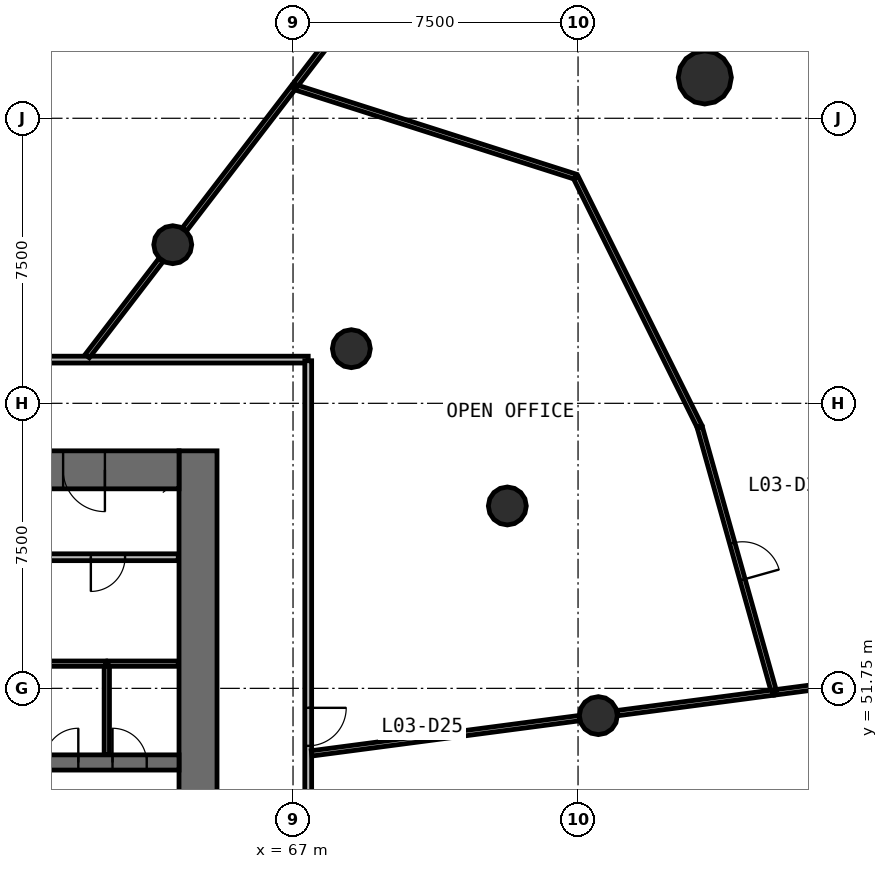
"""IFC4 building model, lengths in metres.
Left out: names, types, materials, properties, quantities, classifications, styles, units other than length and angle.
Written with IfcOpenShell. Run it as: python <this file> out.ifc"""

import sys

from ifc_helpers import new_model, si_unit, direction, frame, frame_2d, origin, origin_2d, place, context, subcontext, project, spatial, rectangle, circle, extrude, source, transform, mapped, element, fill, save


model = new_model("IFC4")
c1 = context("Model", 3, precision=1e-05, world=origin(), true_north=direction((0.0, 1.0)))
c2 = subcontext(c1, "Body", "Model", "MODEL_VIEW")
j1 = project(units=[si_unit("LENGTHUNIT", "METRE"), si_unit("PLANEANGLEUNIT", "RADIAN")], contexts=[c1])
p1 = place(None, origin())
s1 = spatial("IfcSite", under=j1, at=p1, CompositionType="ELEMENT")
p2 = place(p1, origin())
s2 = spatial("IfcBuilding", under=s1, at=p2, CompositionType="ELEMENT")
p3 = place(p2, frame((0.0, 0.0, 13.8)))
s3 = spatial("IfcBuildingStorey", under=s2, at=p3, CompositionType="ELEMENT", Elevation=13.8)
p4 = place(p3, frame((64.5, 38.0, 0.0), z_axis=(0.0, 0.0, 1.0), x_axis=(0.0, 1.0, 0.0)))
e1 = element("IfcWall", 1, at=p4, inside=s3, PredefinedType="SHEAR", context=c2, shape_type="SweptSolid", body=[
    extrude(rectangle(XDim=20.0, YDim=1.0, at=frame_2d((10.0, 0.0))), origin(), (0.0, 0.0, 1.0), 4.4),
])
p5 = place(p4, frame((9.1, 0.0, 0.0)))
e2 = element("IfcOpeningElement", 2, at=p5, cuts=e1, PredefinedType="OPENING", context=c2, shape_type="SweptSolid", body=[
    extrude(rectangle(XDim=1.8, YDim=2.1, at=frame_2d((0.9, 1.05))), frame((0.0, 0.51, 0.0), z_axis=(0.0, -1.0, 0.0), x_axis=(1.0, 0.0, 0.0)), (0.0, 0.0, 1.0), 1.02),
])
p6 = place(p3, frame((64.0, 57.5, 0.0), z_axis=(0.0, 0.0, 1.0), x_axis=(-1.0, 0.0, 0.0)))
e3 = element("IfcWall", 3, at=p6, inside=s3, PredefinedType="SHEAR", context=c2, shape_type="SweptSolid", body=[
    extrude(rectangle(XDim=24.0, YDim=1.0, at=frame_2d((12.0, 0.0))), origin(), (0.0, 0.0, 1.0), 4.4),
])
p7 = place(p6, frame((21.45, 0.0, 0.0)))
e4 = element("IfcOpeningElement", 4, at=p7, cuts=e3, PredefinedType="OPENING", context=c2, shape_type="SweptSolid", body=[
    extrude(rectangle(XDim=1.1, YDim=2.1, at=frame_2d((0.55, 1.05))), frame((0.0, 0.51, 0.0), z_axis=(0.0, -1.0, 0.0), x_axis=(1.0, 0.0, 0.0)), (0.0, 0.0, 1.0), 1.02),
])
p8 = place(p6, frame((1.95, 0.0, 0.0)))
e5 = element("IfcOpeningElement", 5, at=p8, cuts=e3, PredefinedType="OPENING", context=c2, shape_type="SweptSolid", body=[
    extrude(rectangle(XDim=1.1, YDim=2.1, at=frame_2d((0.55, 1.05))), frame((0.0, 0.51, 0.0), z_axis=(0.0, -1.0, 0.0), x_axis=(1.0, 0.0, 0.0)), (0.0, 0.0, 1.0), 1.02),
])
p9 = place(p3, frame((40.0, 49.8, 0.0), z_axis=(0.0, 0.0, 1.0), x_axis=(1.0, 0.0, 0.0)))
e6 = element("IfcWall", 6, at=p9, inside=s3, PredefinedType="SHEAR", context=c2, shape_type="SweptSolid", body=[
    extrude(rectangle(XDim=24.0, YDim=0.4, at=frame_2d((12.0, 0.0))), origin(), (0.0, 0.0, 1.0), 4.4),
])
p10 = place(p9, frame((4.5, 0.0, 0.0)))
e7 = element("IfcOpeningElement", 7, at=p10, cuts=e6, PredefinedType="OPENING", context=c2, shape_type="SweptSolid", body=[
    extrude(rectangle(XDim=1.1, YDim=2.1, at=frame_2d((0.55, 1.05))), frame((0.0, 0.21, 0.0), z_axis=(0.0, -1.0, 0.0), x_axis=(1.0, 0.0, 0.0)), (0.0, 0.0, 1.0), 0.42),
])
p11 = place(p9, frame((7.0, 0.0, 0.0)))
e8 = element("IfcOpeningElement", 8, at=p11, cuts=e6, PredefinedType="OPENING", context=c2, shape_type="SweptSolid", body=[
    extrude(rectangle(XDim=1.1, YDim=2.1, at=frame_2d((0.55, 1.05))), frame((0.0, 0.21, 0.0), z_axis=(0.0, -1.0, 0.0), x_axis=(1.0, 0.0, 0.0)), (0.0, 0.0, 1.0), 0.42),
])
p12 = place(p9, frame((9.5, 0.0, 0.0)))
e9 = element("IfcOpeningElement", 9, at=p12, cuts=e6, PredefinedType="OPENING", context=c2, shape_type="SweptSolid", body=[
    extrude(rectangle(XDim=1.1, YDim=2.1, at=frame_2d((0.55, 1.05))), frame((0.0, 0.21, 0.0), z_axis=(0.0, -1.0, 0.0), x_axis=(1.0, 0.0, 0.0)), (0.0, 0.0, 1.0), 0.42),
])
p13 = place(p9, frame((0.9, 0.0, 0.0)))
e10 = element("IfcOpeningElement", 10, at=p13, cuts=e6, PredefinedType="OPENING", context=c2, shape_type="SweptSolid", body=[
    extrude(rectangle(XDim=1.8, YDim=2.4, at=frame_2d((0.9, 1.2))), frame((0.0, 0.21, 0.0), z_axis=(0.0, -1.0, 0.0), x_axis=(1.0, 0.0, 0.0)), (0.0, 0.0, 1.0), 0.42),
])
p14 = place(p9, frame((20.45, 0.0, 0.0)))
e11 = element("IfcOpeningElement", 11, at=p14, cuts=e6, PredefinedType="OPENING", context=c2, shape_type="SweptSolid", body=[
    extrude(rectangle(XDim=0.9, YDim=2.1, at=frame_2d((0.45, 1.05))), frame((0.0, 0.21, 0.0), z_axis=(0.0, -1.0, 0.0), x_axis=(1.0, 0.0, 0.0)), (0.0, 0.0, 1.0), 0.42),
])
p15 = place(p9, frame((22.25, 0.0, 0.0)))
e12 = element("IfcOpeningElement", 12, at=p15, cuts=e6, PredefinedType="OPENING", context=c2, shape_type="SweptSolid", body=[
    extrude(rectangle(XDim=0.9, YDim=2.1, at=frame_2d((0.45, 1.05))), frame((0.0, 0.21, 0.0), z_axis=(0.0, -1.0, 0.0), x_axis=(1.0, 0.0, 0.0)), (0.0, 0.0, 1.0), 0.42),
])
p16 = place(p9, frame((11.65, 0.0, 0.0)))
e13 = element("IfcOpeningElement", 13, at=p16, cuts=e6, PredefinedType="OPENING", context=c2, shape_type="SweptSolid", body=[
    extrude(rectangle(XDim=0.9, YDim=2.1, at=frame_2d((0.45, 1.05))), frame((0.0, 0.21, 0.0), z_axis=(0.0, -1.0, 0.0), x_axis=(1.0, 0.0, 0.0)), (0.0, 0.0, 1.0), 0.42),
])
m1 = source(origin(), c2, "Body", "SweptSolid", [
    extrude(circle(Radius=0.7, at=origin_2d()), origin(), (0.0, 0.0, 1.0), 4.4),
])
p17 = place(p3, frame((77.836, 67.824, 0.0), z_axis=(0.0, 0.0, 1.0), x_axis=(1.0, 0.0, 0.0)))
e14 = element("IfcColumn", 14, at=p17, inside=s3, PredefinedType="COLUMN", context=c2, shape_type="MappedRepresentation", body=[
    mapped(m1, transform((0.0, 0.0, 0.0), scale=1.0)),
])
m2 = source(origin(), c2, "Body", "SweptSolid", [
    extrude(circle(Radius=0.5, at=origin_2d()), origin(), (0.0, 0.0, 1.0), 4.4),
])
for number, where, z_axis, x_axis in (
    (15, (75.034, 51.032, 0.0), (0.0, 0.0, 1.0), (1.0, 0.0, 0.0)),
    (16, (72.639, 56.549, 0.0), (0.0, 0.0, 1.0), (1.0, 0.0, 0.0)),
    (17, (68.535, 60.688, 0.0), (0.0, 0.0, 1.0), (1.0, 0.0, 0.0)),
    (18, (63.835, 63.424, 0.0), (0.0, 0.0, 1.0), (1.0, 0.0, 0.0)),
):
    element("IfcColumn", number, at=place(p3, frame(where, z_axis=z_axis, x_axis=x_axis)), inside=s3, PredefinedType="COLUMN", context=c2, shape_type="MappedRepresentation", body=[
        mapped(m2, transform((0.0, 0.0, 0.0), scale=1.0)),
    ])
p18 = place(p3, frame((36.6, 60.4, 0.0), z_axis=(0.0, 0.0, 1.0), x_axis=(1.0, 0.0, 0.0)))
e19 = element("IfcWall", 19, at=p18, inside=s3, PredefinedType="PARTITIONING", context=c2, shape_type="SweptSolid", body=[
    extrude(rectangle(XDim=30.8, YDim=0.18, at=frame_2d((15.4, 0.0))), origin(), (0.0, 0.0, 1.0), 3.25),
])
p19 = place(p18, frame((17.35, 0.0, 0.0)))
e20 = element("IfcOpeningElement", 20, at=p19, cuts=e19, PredefinedType="OPENING", context=c2, shape_type="SweptSolid", body=[
    extrude(rectangle(XDim=1.0, YDim=2.1, at=frame_2d((0.5, 1.05))), frame((0.0, 0.1, 0.0), z_axis=(0.0, -1.0, 0.0), x_axis=(1.0, 0.0, 0.0)), (0.0, 0.0, 1.0), 0.2),
])
p20 = place(p18, frame((14.85, 0.0, 0.0)))
e21 = element("IfcOpeningElement", 21, at=p20, cuts=e19, PredefinedType="OPENING", context=c2, shape_type="SweptSolid", body=[
    extrude(rectangle(XDim=0.9, YDim=2.1, at=frame_2d((0.45, 1.05))), frame((0.0, 0.1, 0.0), z_axis=(0.0, -1.0, 0.0), x_axis=(1.0, 0.0, 0.0)), (0.0, 0.0, 1.0), 0.2),
])
p21 = place(p18, frame((12.65, 0.0, 0.0)))
e22 = element("IfcOpeningElement", 22, at=p21, cuts=e19, PredefinedType="OPENING", context=c2, shape_type="SweptSolid", body=[
    extrude(rectangle(XDim=0.9, YDim=2.1, at=frame_2d((0.45, 1.05))), frame((0.0, 0.1, 0.0), z_axis=(0.0, -1.0, 0.0), x_axis=(1.0, 0.0, 0.0)), (0.0, 0.0, 1.0), 0.2),
])
p22 = place(p18, frame((8.95, 0.0, 0.0)))
e23 = element("IfcOpeningElement", 23, at=p22, cuts=e19, PredefinedType="OPENING", context=c2, shape_type="SweptSolid", body=[
    extrude(rectangle(XDim=1.0, YDim=2.1, at=frame_2d((0.5, 1.05))), frame((0.0, 0.1, 0.0), z_axis=(0.0, -1.0, 0.0), x_axis=(1.0, 0.0, 0.0)), (0.0, 0.0, 1.0), 0.2),
])
p23 = place(p3, frame((67.4, 60.37, 0.0), z_axis=(0.0, 0.0, 1.0), x_axis=(0.0, -1.0, 0.0)))
e24 = element("IfcWall", 24, at=p23, inside=s3, PredefinedType="PARTITIONING", context=c2, shape_type="SweptSolid", body=[
    extrude(rectangle(XDim=23.583, YDim=0.18, at=frame_2d((11.791, 0.0))), origin(), (0.0, 0.0, 1.0), 3.25),
])
p24 = place(p23, frame((11.333, 0.0, 0.0)))
e25 = element("IfcOpeningElement", 25, at=p24, cuts=e24, PredefinedType="OPENING", context=c2, shape_type="SweptSolid", body=[
    extrude(rectangle(XDim=1.0, YDim=2.1, at=frame_2d((0.5, 1.05))), frame((0.0, 0.1, 0.0), z_axis=(0.0, -1.0, 0.0), x_axis=(1.0, 0.0, 0.0)), (0.0, 0.0, 1.0), 0.2),
])
p25 = place(p23, frame((9.133, 0.0, 0.0)))
e26 = element("IfcOpeningElement", 26, at=p25, cuts=e24, PredefinedType="OPENING", context=c2, shape_type="SweptSolid", body=[
    extrude(rectangle(XDim=1.0, YDim=2.1, at=frame_2d((0.5, 1.05))), frame((0.0, 0.1, 0.0), z_axis=(0.0, -1.0, 0.0), x_axis=(1.0, 0.0, 0.0)), (0.0, 0.0, 1.0), 0.2),
])
p26 = place(p23, frame((19.133, 0.0, 0.0)))
e27 = element("IfcOpeningElement", 27, at=p26, cuts=e24, PredefinedType="OPENING", context=c2, shape_type="SweptSolid", body=[
    extrude(rectangle(XDim=1.0, YDim=2.1, at=frame_2d((0.5, 1.05))), frame((0.0, 0.1, 0.0), z_axis=(0.0, -1.0, 0.0), x_axis=(1.0, 0.0, 0.0)), (0.0, 0.0, 1.0), 0.2),
])
p27 = place(p3, frame((63.98, 55.2, 0.0), z_axis=(0.0, 0.0, 1.0), x_axis=(-1.0, 0.0, 0.0)))
e28 = element("IfcWall", 28, at=p27, inside=s3, PredefinedType="PARTITIONING", context=c2, shape_type="SweptSolid", body=[
    extrude(rectangle(XDim=3.75, YDim=0.18, at=frame_2d((1.875, 0.0))), origin(), (0.0, 0.0, 1.0), 4.05),
])
p28 = place(p27, frame((1.4, 0.0, 0.0)))
e29 = element("IfcOpeningElement", 29, at=p28, cuts=e28, PredefinedType="OPENING", context=c2, shape_type="SweptSolid", body=[
    extrude(rectangle(XDim=0.9, YDim=2.1, at=frame_2d((0.45, 1.05))), frame((0.0, 0.1, 0.0), z_axis=(0.0, -1.0, 0.0), x_axis=(1.0, 0.0, 0.0)), (0.0, 0.0, 1.0), 0.2),
])
p29 = place(p3, frame((74.432, 65.213, 0.0), z_axis=(0.0, 0.0, 1.0), x_axis=(-0.952603673554, 0.304214136967, 0.0)))
e30 = element("IfcWall", 30, at=p29, inside=s3, PredefinedType="PARTITIONING", context=c2, shape_type="SweptSolid", body=[
    extrude(rectangle(XDim=7.777, YDim=0.14, at=frame_2d((3.889, 0.0))), origin(), (0.0, 0.0, 1.0), 3.25),
])
p30 = place(p3, frame((79.66, 51.642, 0.0), z_axis=(0.0, 0.0, 1.0), x_axis=(0.991446737275, 0.130511942543, 0.0)))
e31 = element("IfcWall", 31, at=p30, inside=s3, PredefinedType="PARTITIONING", context=c2, shape_type="SweptSolid", body=[
    extrude(rectangle(XDim=7.698, YDim=0.14, at=frame_2d((3.849, 0.0))), origin(), (0.0, 0.0, 1.0), 3.25),
])
p31 = place(p3, frame((77.696, 58.644, 0.0), z_axis=(0.0, 0.0, 1.0), x_axis=(-0.444912861123, 0.895573864071, 0.0)))
e32 = element("IfcWall", 32, at=p31, inside=s3, PredefinedType="PARTITIONING", context=c2, shape_type="SweptSolid", body=[
    extrude(rectangle(XDim=7.305, YDim=0.14, at=frame_2d((3.653, 0.0))), origin(), (0.0, 0.0, 1.0), 3.25),
])
p32 = place(p3, frame((77.704, 58.615, 0.0), z_axis=(0.0, 0.0, 1.0), x_axis=(0.27015344918, -0.9628172796, 0.0)))
e33 = element("IfcWall", 33, at=p32, inside=s3, PredefinedType="PARTITIONING", context=c2, shape_type="SweptSolid", body=[
    extrude(rectangle(XDim=7.212, YDim=0.14, at=frame_2d((3.606, 0.0))), origin(), (0.0, 0.0, 1.0), 3.25),
])
p33 = place(p32, frame((3.163, 0.0, 0.0)))
e34 = element("IfcOpeningElement", 34, at=p33, cuts=e33, PredefinedType="OPENING", context=c2, shape_type="SweptSolid", body=[
    extrude(rectangle(XDim=1.0, YDim=2.1, at=frame_2d((0.5, 1.05))), frame((0.0, 0.08, 0.0), z_axis=(0.0, -1.0, 0.0), x_axis=(1.0, 0.0, 0.0)), (0.0, 0.0, 1.0), 0.16),
])
p34 = place(p3, frame((67.49, 50.039, 0.0), z_axis=(0.0, 0.0, 1.0), x_axis=(0.99144622305, 0.130515848849, 0.0)))
e35 = element("IfcWall", 35, at=p34, inside=s3, PredefinedType="PARTITIONING", context=c2, shape_type="SweptSolid", body=[
    extrude(rectangle(XDim=7.104, YDim=0.14, at=frame_2d((3.552, 0.0))), origin(), (0.0, 0.0, 1.0), 3.25),
])
p35 = place(p3, frame((67.069, 67.638, 0.0), z_axis=(0.0, 0.0, 1.0), x_axis=(0.608784649219, 0.793335522258, 0.0)))
e36 = element("IfcWall", 36, at=p35, inside=s3, PredefinedType="PARTITIONING", context=c2, shape_type="SweptSolid", body=[
    extrude(rectangle(XDim=4.92, YDim=0.14, at=frame_2d((2.46, 0.0))), origin(), (0.0, 0.0, 1.0), 3.25),
])
p36 = place(p3, frame((64.142, 63.824, 0.0), z_axis=(0.0, 0.0, 1.0), x_axis=(0.608759522286, 0.793354803368, 0.0)))
e37 = element("IfcWall", 37, at=p36, inside=s3, PredefinedType="PARTITIONING", context=c2, shape_type="SweptSolid", body=[
    extrude(rectangle(XDim=4.703, YDim=0.14, at=frame_2d((2.352, 0.0))), origin(), (0.0, 0.0, 1.0), 3.25),
])
p37 = place(p3, frame((75.534, 51.098, 0.0), z_axis=(0.0, 0.0, 1.0), x_axis=(0.99144685344, 0.130511060083, 0.0)))
e38 = element("IfcWall", 38, at=p37, inside=s3, PredefinedType="PARTITIONING", context=c2, shape_type="SweptSolid", body=[
    extrude(rectangle(XDim=4.132, YDim=0.14, at=frame_2d((2.066, 0.0))), origin(), (0.0, 0.0, 1.0), 3.25),
])
p38 = place(p3, frame((61.584, 60.49, 0.0), z_axis=(0.0, 0.0, 1.0), x_axis=(0.60874605662, 0.793365135703, 0.0)))
e39 = element("IfcWall", 39, at=p38, inside=s3, PredefinedType="PARTITIONING", context=c2, shape_type="SweptSolid", body=[
    extrude(rectangle(XDim=3.194, YDim=0.14, at=frame_2d((1.597, 0.0))), origin(), (0.0, 0.0, 1.0), 3.25),
])
p39 = place(p3, frame((62.1, 50.01, 0.0), z_axis=(0.0, 0.0, 1.0), x_axis=(0.0, 1.0, 0.0)))
e40 = element("IfcWall", 40, at=p39, inside=s3, PredefinedType="PARTITIONING", context=c2, shape_type="SweptSolid", body=[
    extrude(rectangle(XDim=2.39, YDim=0.14, at=frame_2d((1.195, 0.0))), origin(), (0.0, 0.0, 1.0), 3.25),
])
p40 = place(p3, frame((62.07, 52.4, 0.0), z_axis=(0.0, 0.0, 1.0), x_axis=(-1.0, 0.0, 0.0)))
e41 = element("IfcWall", 41, at=p40, inside=s3, PredefinedType="PARTITIONING", context=c2, shape_type="SweptSolid", body=[
    extrude(rectangle(XDim=1.84, YDim=0.14, at=frame_2d((0.92, 0.0))), origin(), (0.0, 0.0, 1.0), 3.25),
])
p41 = place(p3, frame((63.98, 52.4, 0.0), z_axis=(0.0, 0.0, 1.0), x_axis=(-1.0, 0.0, 0.0)))
e42 = element("IfcWall", 42, at=p41, inside=s3, PredefinedType="PARTITIONING", context=c2, shape_type="SweptSolid", body=[
    extrude(rectangle(XDim=1.85, YDim=0.14, at=frame_2d((0.925, 0.0))), origin(), (0.0, 0.0, 1.0), 3.25),
])
m3 = source(origin(), c2, "Body", "SweptSolid", [
    extrude(rectangle(XDim=1.1, YDim=2.1, at=frame_2d((0.55, 1.05))), frame((0.0, 0.025, 0.0), z_axis=(0.0, -1.0, 0.0), x_axis=(1.0, 0.0, 0.0)), (0.0, 0.0, 1.0), 0.05),
])
p42 = place(p8, origin())
e43 = element("IfcDoor", 43, at=p42, inside=s3, OperationType="SINGLE_SWING_LEFT", PredefinedType="DOOR", context=c2, shape_type="MappedRepresentation", body=[
    mapped(m3, transform((0.0, 0.0, 0.0), scale=1.0)),
])
fill(e5, e43)
m4 = source(origin(), c2, "Body", "SweptSolid", [
    extrude(rectangle(XDim=1.0, YDim=2.1, at=frame_2d((0.5, 1.05))), frame((0.0, 0.025, 0.0), z_axis=(0.0, -1.0, 0.0), x_axis=(1.0, 0.0, 0.0)), (0.0, 0.0, 1.0), 0.05),
])
p43 = place(p25, origin())
e44 = element("IfcDoor", 44, at=p43, inside=s3, OperationType="SINGLE_SWING_LEFT", PredefinedType="DOOR", context=c2, shape_type="MappedRepresentation", body=[
    mapped(m4, transform((0.0, 0.0, 0.0), scale=1.0)),
])
fill(e26, e44)
p44 = place(p33, origin())
e45 = element("IfcDoor", 45, at=p44, inside=s3, OperationType="SINGLE_SWING_RIGHT", PredefinedType="DOOR", context=c2, shape_type="MappedRepresentation", body=[
    mapped(m4, transform((0.0, 0.0, 0.0), scale=1.0)),
])
fill(e34, e45)
m5 = source(origin(), c2, "Body", "SweptSolid", [
    extrude(rectangle(XDim=0.9, YDim=2.1, at=frame_2d((0.45, 1.05))), frame((0.0, 0.025, 0.0), z_axis=(0.0, -1.0, 0.0), x_axis=(1.0, 0.0, 0.0)), (0.0, 0.0, 1.0), 0.05),
])
p45 = place(p14, origin())
e46 = element("IfcDoor", 46, at=p45, inside=s3, OperationType="SINGLE_SWING_RIGHT", PredefinedType="DOOR", context=c2, shape_type="MappedRepresentation", body=[
    mapped(m5, transform((0.0, 0.0, 0.0), scale=1.0)),
])
fill(e11, e46)
p46 = place(p15, origin())
e47 = element("IfcDoor", 47, at=p46, inside=s3, OperationType="SINGLE_SWING_LEFT", PredefinedType="DOOR", context=c2, shape_type="MappedRepresentation", body=[
    mapped(m5, transform((0.0, 0.0, 0.0), scale=1.0)),
])
fill(e12, e47)
p47 = place(p28, origin())
e48 = element("IfcDoor", 48, at=p47, inside=s3, OperationType="SINGLE_SWING_RIGHT", PredefinedType="DOOR", context=c2, shape_type="MappedRepresentation", body=[
    mapped(m5, transform((0.0, 0.0, 0.0), scale=1.0)),
])
fill(e29, e48)
save(model, sys.argv[1])
